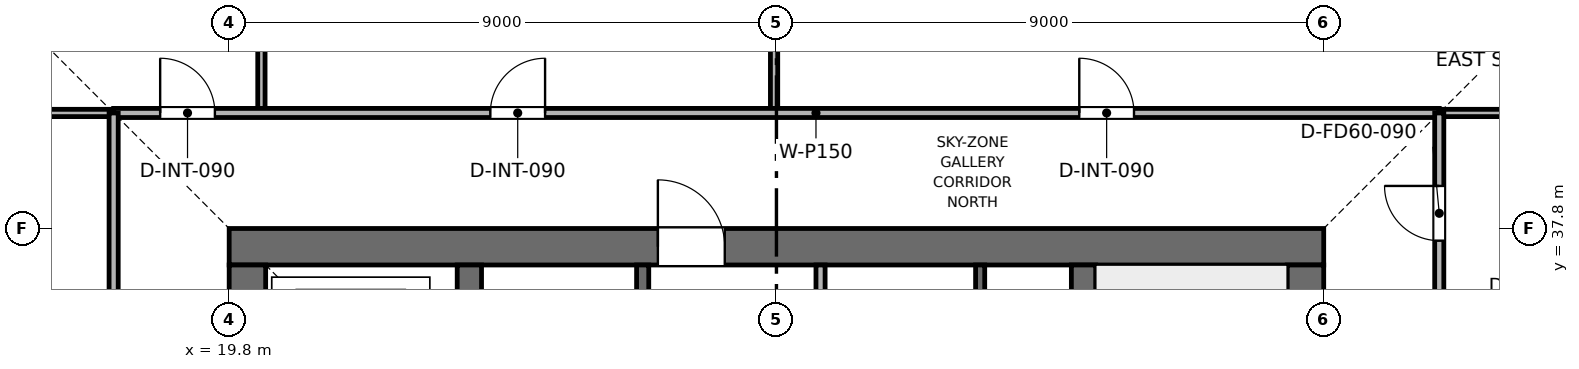
"""IFC4 building model, lengths in metres.
Left out: names, types, materials, properties, quantities, classifications, styles, units other than length and angle.
Written with IfcOpenShell. Run it as: python <this file> out.ifc"""

import sys

from ifc_helpers import new_model, si_unit, direction, frame, frame_2d, origin, place, context, subcontext, project, spatial, rectangle, extrude, element, fill, save


model = new_model("IFC4")
c1 = context("Model", 3, precision=1e-05, world=origin(), true_north=direction((0.0, 1.0)))
c2 = subcontext(c1, "Body", "Model", "MODEL_VIEW")
j1 = project(units=[si_unit("LENGTHUNIT", "METRE"), si_unit("PLANEANGLEUNIT", "RADIAN")], contexts=[c1])
p1 = place(None, origin())
s1 = spatial("IfcSite", under=j1, at=p1, CompositionType="ELEMENT")
p2 = place(p1, origin())
s2 = spatial("IfcBuilding", under=s1, at=p2, CompositionType="ELEMENT")
p3 = place(p2, frame((0.0, 0.0, 333.0)))
s3 = spatial("IfcBuildingStorey", under=s2, at=p3, CompositionType="ELEMENT", Elevation=333.0)
p4 = place(p3, frame((19.8, 37.5, 0.0), z_axis=(0.0, 0.0, 1.0), x_axis=(1.0, 0.0, 0.0)))
e1 = element("IfcWall", 1, at=p4, inside=s3, PredefinedType="SHEAR", context=c2, shape_type="SweptSolid", body=[
    extrude(rectangle(XDim=18.0, YDim=0.6, at=frame_2d((9.0, 0.0))), origin(), (0.0, 0.0, 1.0), 3.75),
])
p5 = place(p4, frame((7.05, 0.0, 0.0)))
e2 = element("IfcOpeningElement", 2, at=p5, cuts=e1, PredefinedType="OPENING", context=c2, shape_type="SweptSolid", body=[
    extrude(rectangle(XDim=1.1, YDim=2.15, at=frame_2d((0.55, 1.075))), frame((0.0, 0.31, 0.0), z_axis=(0.0, -1.0, 0.0), x_axis=(1.0, 0.0, 0.0)), (0.0, 0.0, 1.0), 0.62),
])
p6 = place(p3, frame((20.1, 20.4, 0.0), z_axis=(0.0, 0.0, 1.0), x_axis=(0.0, 1.0, 0.0)))
e3 = element("IfcWall", 3, at=p6, inside=s3, PredefinedType="SHEAR", context=c2, shape_type="SweptSolid", body=[
    extrude(rectangle(XDim=16.8, YDim=0.6, at=frame_2d((8.4, 0.0))), origin(), (0.0, 0.0, 1.0), 3.75),
])
p7 = place(p6, frame((10.4, 0.0, 0.0)))
e4 = element("IfcOpeningElement", 4, at=p7, cuts=e3, PredefinedType="OPENING", context=c2, shape_type="SweptSolid", body=[
    extrude(rectangle(XDim=1.1, YDim=2.15, at=frame_2d((0.55, 1.075))), frame((0.0, 0.31, 0.0), z_axis=(0.0, -1.0, 0.0), x_axis=(1.0, 0.0, 0.0)), (0.0, 0.0, 1.0), 0.62),
])
p8 = place(p3, frame((37.5, 20.4, 0.0), z_axis=(0.0, 0.0, 1.0), x_axis=(0.0, 1.0, 0.0)))
e5 = element("IfcWall", 5, at=p8, inside=s3, PredefinedType="SHEAR", context=c2, shape_type="SweptSolid", body=[
    extrude(rectangle(XDim=16.8, YDim=0.6, at=frame_2d((8.4, 0.0))), origin(), (0.0, 0.0, 1.0), 3.75),
])
p9 = place(p8, frame((4.9, 0.0, 0.0)))
e6 = element("IfcOpeningElement", 6, at=p9, cuts=e5, PredefinedType="OPENING", context=c2, shape_type="SweptSolid", body=[
    extrude(rectangle(XDim=1.1, YDim=2.15, at=frame_2d((0.55, 1.075))), frame((0.0, 0.31, 0.0), z_axis=(0.0, -1.0, 0.0), x_axis=(1.0, 0.0, 0.0)), (0.0, 0.0, 1.0), 0.62),
])
for number, where, z_axis, x_axis in (
    (7, (23.75, 20.4, 0.0), (0.0, 0.0, 1.0), (0.0, 1.0, 0.0)),
    (8, (33.85, 20.4, 0.0), (0.0, 0.0, 1.0), (0.0, 1.0, 0.0)),
):
    element("IfcWall", number, at=place(p3, frame(where, z_axis=z_axis, x_axis=x_axis)), inside=s3, PredefinedType="SHEAR", context=c2, shape_type="SweptSolid", body=[
        extrude(rectangle(XDim=16.8, YDim=0.4, at=frame_2d((8.4, 0.0))), origin(), (0.0, 0.0, 1.0), 3.75),
    ])
p10 = place(p3, frame((32.15, 34.0, 0.0), z_axis=(0.0, 0.0, 1.0), x_axis=(0.0, 1.0, 0.0)))
e9 = element("IfcWall", 9, at=p10, inside=s3, PredefinedType="SHEAR", context=c2, shape_type="SweptSolid", body=[
    extrude(rectangle(XDim=3.2, YDim=0.15, at=frame_2d((1.6, 0.0))), origin(), (0.0, 0.0, 1.0), 3.51),
])
p11 = place(p3, frame((26.6, 34.0, 0.0), z_axis=(0.0, 0.0, 1.0), x_axis=(0.0, 1.0, 0.0)))
e10 = element("IfcWall", 10, at=p11, inside=s3, PredefinedType="SHEAR", context=c2, shape_type="SweptSolid", body=[
    extrude(rectangle(XDim=3.2, YDim=0.2, at=frame_2d((1.6, 0.0))), origin(), (0.0, 0.0, 1.0), 3.51),
])
p12 = place(p11, frame((0.75, 0.0, 0.0)))
e11 = element("IfcOpeningElement", 11, at=p12, cuts=e10, PredefinedType="OPENING", context=c2, shape_type="SweptSolid", body=[
    extrude(rectangle(XDim=1.1, YDim=2.15, at=frame_2d((0.55, 1.075))), frame((0.0, 0.11, 0.0), z_axis=(0.0, -1.0, 0.0), x_axis=(1.0, 0.0, 0.0)), (0.0, 0.0, 1.0), 0.22),
])
p13 = place(p3, frame((29.525, 33.925, 0.0), z_axis=(0.0, 0.0, 1.0), x_axis=(0.0, 1.0, 0.0)))
e12 = element("IfcWall", 12, at=p13, inside=s3, PredefinedType="PARTITIONING", context=c2, shape_type="SweptSolid", body=[
    extrude(rectangle(XDim=3.275, YDim=0.15, at=frame_2d((1.637, 0.0))), origin(), (0.0, 0.0, 1.0), 3.51),
])
p14 = place(p13, frame((0.85, 0.0, 0.0)))
e13 = element("IfcOpeningElement", 13, at=p14, cuts=e12, PredefinedType="OPENING", context=c2, shape_type="SweptSolid", body=[
    extrude(rectangle(XDim=0.9, YDim=2.1, at=frame_2d((0.45, 1.05))), frame((0.0, 0.085, 0.0), z_axis=(0.0, -1.0, 0.0), x_axis=(1.0, 0.0, 0.0)), (0.0, 0.0, 1.0), 0.17),
])
p15 = place(p3, frame((20.33, 39.7, 0.0), z_axis=(0.0, 0.0, 1.0), x_axis=(0.0, 1.0, 0.0)))
e14 = element("IfcWall", 14, at=p15, inside=s3, PredefinedType="PARTITIONING", context=c2, shape_type="SweptSolid", body=[
    extrude(rectangle(XDim=11.17, YDim=0.12, at=frame_2d((5.585, 0.0))), origin(), (0.0, 0.0, 1.0), 3.095),
])
p16 = place(p3, frame((28.761, 39.7, 0.0), z_axis=(0.0, 0.0, 1.0), x_axis=(0.0, 1.0, 0.0)))
e15 = element("IfcWall", 15, at=p16, inside=s3, PredefinedType="PARTITIONING", context=c2, shape_type="SweptSolid", body=[
    extrude(rectangle(XDim=11.17, YDim=0.12, at=frame_2d((5.585, 0.0))), origin(), (0.0, 0.0, 1.0), 2.995),
])
p17 = place(p3, frame((6.73, 39.7, 0.0), z_axis=(0.0, 0.0, 1.0), x_axis=(1.0, 0.0, 0.0)))
e16 = element("IfcWall", 16, at=p17, inside=s3, PredefinedType="PARTITIONING", context=c2, shape_type="SweptSolid", body=[
    extrude(rectangle(XDim=11.17, YDim=0.12, at=frame_2d((5.585, 0.0))), origin(), (0.0, 0.0, 1.0), 3.095),
])
p18 = place(p3, frame((39.7, 39.7, 0.0), z_axis=(0.0, 0.0, 1.0), x_axis=(1.0, 0.0, 0.0)))
e17 = element("IfcWall", 17, at=p18, inside=s3, PredefinedType="PARTITIONING", context=c2, shape_type="SweptSolid", body=[
    extrude(rectangle(XDim=11.17, YDim=0.12, at=frame_2d((5.585, 0.0))), origin(), (0.0, 0.0, 1.0), 3.095),
])
p19 = place(p3, frame((17.9, 39.7, 0.0), z_axis=(0.0, 0.0, 1.0), x_axis=(1.0, 0.0, 0.0)))
e18 = element("IfcWall", 18, at=p19, inside=s3, PredefinedType="PARTITIONING", context=c2, shape_type="SweptSolid", body=[
    extrude(rectangle(XDim=21.8, YDim=0.15, at=frame_2d((10.9, 0.0))), origin(), (0.0, 0.0, 1.0), 3.095),
])
p20 = place(p19, frame((0.765, 0.0, 0.0)))
e19 = element("IfcOpeningElement", 19, at=p20, cuts=e18, PredefinedType="OPENING", context=c2, shape_type="SweptSolid", body=[
    extrude(rectangle(XDim=0.9, YDim=2.1, at=frame_2d((0.45, 1.05))), frame((0.0, 0.085, 0.0), z_axis=(0.0, -1.0, 0.0), x_axis=(1.0, 0.0, 0.0)), (0.0, 0.0, 1.0), 0.17),
])
p21 = place(p19, frame((6.195, 0.0, 0.0)))
e20 = element("IfcOpeningElement", 20, at=p21, cuts=e18, PredefinedType="OPENING", context=c2, shape_type="SweptSolid", body=[
    extrude(rectangle(XDim=0.9, YDim=2.1, at=frame_2d((0.45, 1.05))), frame((0.0, 0.085, 0.0), z_axis=(0.0, -1.0, 0.0), x_axis=(1.0, 0.0, 0.0)), (0.0, 0.0, 1.0), 0.17),
])
p22 = place(p19, frame((15.88, 0.0, 0.0)))
e21 = element("IfcOpeningElement", 21, at=p22, cuts=e18, PredefinedType="OPENING", context=c2, shape_type="SweptSolid", body=[
    extrude(rectangle(XDim=0.9, YDim=2.1, at=frame_2d((0.45, 1.05))), frame((0.0, 0.085, 0.0), z_axis=(0.0, -1.0, 0.0), x_axis=(1.0, 0.0, 0.0)), (0.0, 0.0, 1.0), 0.17),
])
p23 = place(p3, frame((17.9, 12.6, 0.0), z_axis=(0.0, 0.0, 1.0), x_axis=(0.0, 1.0, 0.0)))
e22 = element("IfcWall", 22, at=p23, inside=s3, PredefinedType="PARTITIONING", context=c2, shape_type="SweptSolid", body=[
    extrude(rectangle(XDim=27.1, YDim=0.15, at=frame_2d((13.55, 0.0))), origin(), (0.0, 0.0, 1.0), 3.095),
])
p24 = place(p23, frame((13.1, 0.0, 0.0)))
e23 = element("IfcOpeningElement", 23, at=p24, cuts=e22, PredefinedType="OPENING", context=c2, shape_type="SweptSolid", body=[
    extrude(rectangle(XDim=0.9, YDim=2.1, at=frame_2d((0.45, 1.05))), frame((0.0, 0.085, 0.0), z_axis=(0.0, -1.0, 0.0), x_axis=(1.0, 0.0, 0.0)), (0.0, 0.0, 1.0), 0.17),
])
p25 = place(p3, frame((39.7, 24.4, 0.0), z_axis=(0.0, 0.0, 1.0), x_axis=(0.0, 1.0, 0.0)))
e24 = element("IfcWall", 24, at=p25, inside=s3, PredefinedType="PARTITIONING", context=c2, shape_type="SweptSolid", body=[
    extrude(rectangle(XDim=15.3, YDim=0.15, at=frame_2d((7.65, 0.0))), origin(), (0.0, 0.0, 1.0), 3.095),
])
p26 = place(p25, frame((1.35, 0.0, 0.0)))
e25 = element("IfcOpeningElement", 25, at=p26, cuts=e24, PredefinedType="OPENING", context=c2, shape_type="SweptSolid", body=[
    extrude(rectangle(XDim=0.9, YDim=2.1, at=frame_2d((0.45, 1.05))), frame((0.0, 0.085, 0.0), z_axis=(0.0, -1.0, 0.0), x_axis=(1.0, 0.0, 0.0)), (0.0, 0.0, 1.0), 0.17),
])
p27 = place(p25, frame((4.55, 0.0, 0.0)))
e26 = element("IfcOpeningElement", 26, at=p27, cuts=e24, PredefinedType="OPENING", context=c2, shape_type="SweptSolid", body=[
    extrude(rectangle(XDim=0.9, YDim=2.1, at=frame_2d((0.45, 1.05))), frame((0.0, 0.085, 0.0), z_axis=(0.0, -1.0, 0.0), x_axis=(1.0, 0.0, 0.0)), (0.0, 0.0, 1.0), 0.17),
])
p28 = place(p25, frame((7.45, 0.0, 0.0)))
e27 = element("IfcOpeningElement", 27, at=p28, cuts=e24, PredefinedType="OPENING", context=c2, shape_type="SweptSolid", body=[
    extrude(rectangle(XDim=0.9, YDim=2.1, at=frame_2d((0.45, 1.05))), frame((0.0, 0.085, 0.0), z_axis=(0.0, -1.0, 0.0), x_axis=(1.0, 0.0, 0.0)), (0.0, 0.0, 1.0), 0.17),
])
p29 = place(p25, frame((10.2, 0.0, 0.0)))
e28 = element("IfcOpeningElement", 28, at=p29, cuts=e24, PredefinedType="OPENING", context=c2, shape_type="SweptSolid", body=[
    extrude(rectangle(XDim=0.95, YDim=2.1, at=frame_2d((0.475, 1.05))), frame((0.0, 0.085, 0.0), z_axis=(0.0, -1.0, 0.0), x_axis=(1.0, 0.0, 0.0)), (0.0, 0.0, 1.0), 0.17),
])
p30 = place(p25, frame((13.2, 0.0, 0.0)))
e29 = element("IfcOpeningElement", 29, at=p30, cuts=e24, PredefinedType="OPENING", context=c2, shape_type="SweptSolid", body=[
    extrude(rectangle(XDim=0.9, YDim=2.1, at=frame_2d((0.45, 1.05))), frame((0.0, 0.085, 0.0), z_axis=(0.0, -1.0, 0.0), x_axis=(1.0, 0.0, 0.0)), (0.0, 0.0, 1.0), 0.17),
])
p31 = place(p20, origin())
e30 = element("IfcDoor", 30, at=p31, inside=s3, OperationType="SINGLE_SWING_LEFT", PredefinedType="DOOR", context=c2, shape_type="SweptSolid", body=[
    extrude(rectangle(XDim=0.9, YDim=2.1, at=frame_2d((0.45, 1.05))), frame((0.0, 0.025, 0.0), z_axis=(0.0, -1.0, 0.0), x_axis=(1.0, 0.0, 0.0)), (0.0, 0.0, 1.0), 0.05),
])
fill(e19, e30)
p32 = place(p21, origin())
e31 = element("IfcDoor", 31, at=p32, inside=s3, OperationType="SINGLE_SWING_RIGHT", PredefinedType="DOOR", context=c2, shape_type="SweptSolid", body=[
    extrude(rectangle(XDim=0.9, YDim=2.1, at=frame_2d((0.45, 1.05))), frame((0.0, 0.025, 0.0), z_axis=(0.0, -1.0, 0.0), x_axis=(1.0, 0.0, 0.0)), (0.0, 0.0, 1.0), 0.05),
])
fill(e20, e31)
p33 = place(p22, origin())
e32 = element("IfcDoor", 32, at=p33, inside=s3, OperationType="SINGLE_SWING_LEFT", PredefinedType="DOOR", context=c2, shape_type="SweptSolid", body=[
    extrude(rectangle(XDim=0.9, YDim=2.1, at=frame_2d((0.45, 1.05))), frame((0.0, 0.025, 0.0), z_axis=(0.0, -1.0, 0.0), x_axis=(1.0, 0.0, 0.0)), (0.0, 0.0, 1.0), 0.05),
])
fill(e21, e32)
p34 = place(p30, origin())
e33 = element("IfcDoor", 33, at=p34, inside=s3, OperationType="SINGLE_SWING_RIGHT", PredefinedType="DOOR", context=c2, shape_type="SweptSolid", body=[
    extrude(rectangle(XDim=0.9, YDim=2.1, at=frame_2d((0.45, 1.05))), frame((0.0, 0.025, 0.0), z_axis=(0.0, -1.0, 0.0), x_axis=(1.0, 0.0, 0.0)), (0.0, 0.0, 1.0), 0.05),
])
fill(e29, e33)
p35 = place(p5, origin())
e34 = element("IfcDoor", 34, at=p35, inside=s3, OperationType="SINGLE_SWING_LEFT", PredefinedType="DOOR", context=c2, shape_type="SweptSolid", body=[
    extrude(rectangle(XDim=1.1, YDim=2.15, at=frame_2d((0.55, 1.075))), frame((0.0, 0.025, 0.0), z_axis=(0.0, -1.0, 0.0), x_axis=(1.0, 0.0, 0.0)), (0.0, 0.0, 1.0), 0.05),
])
fill(e2, e34)
save(model, sys.argv[1])
